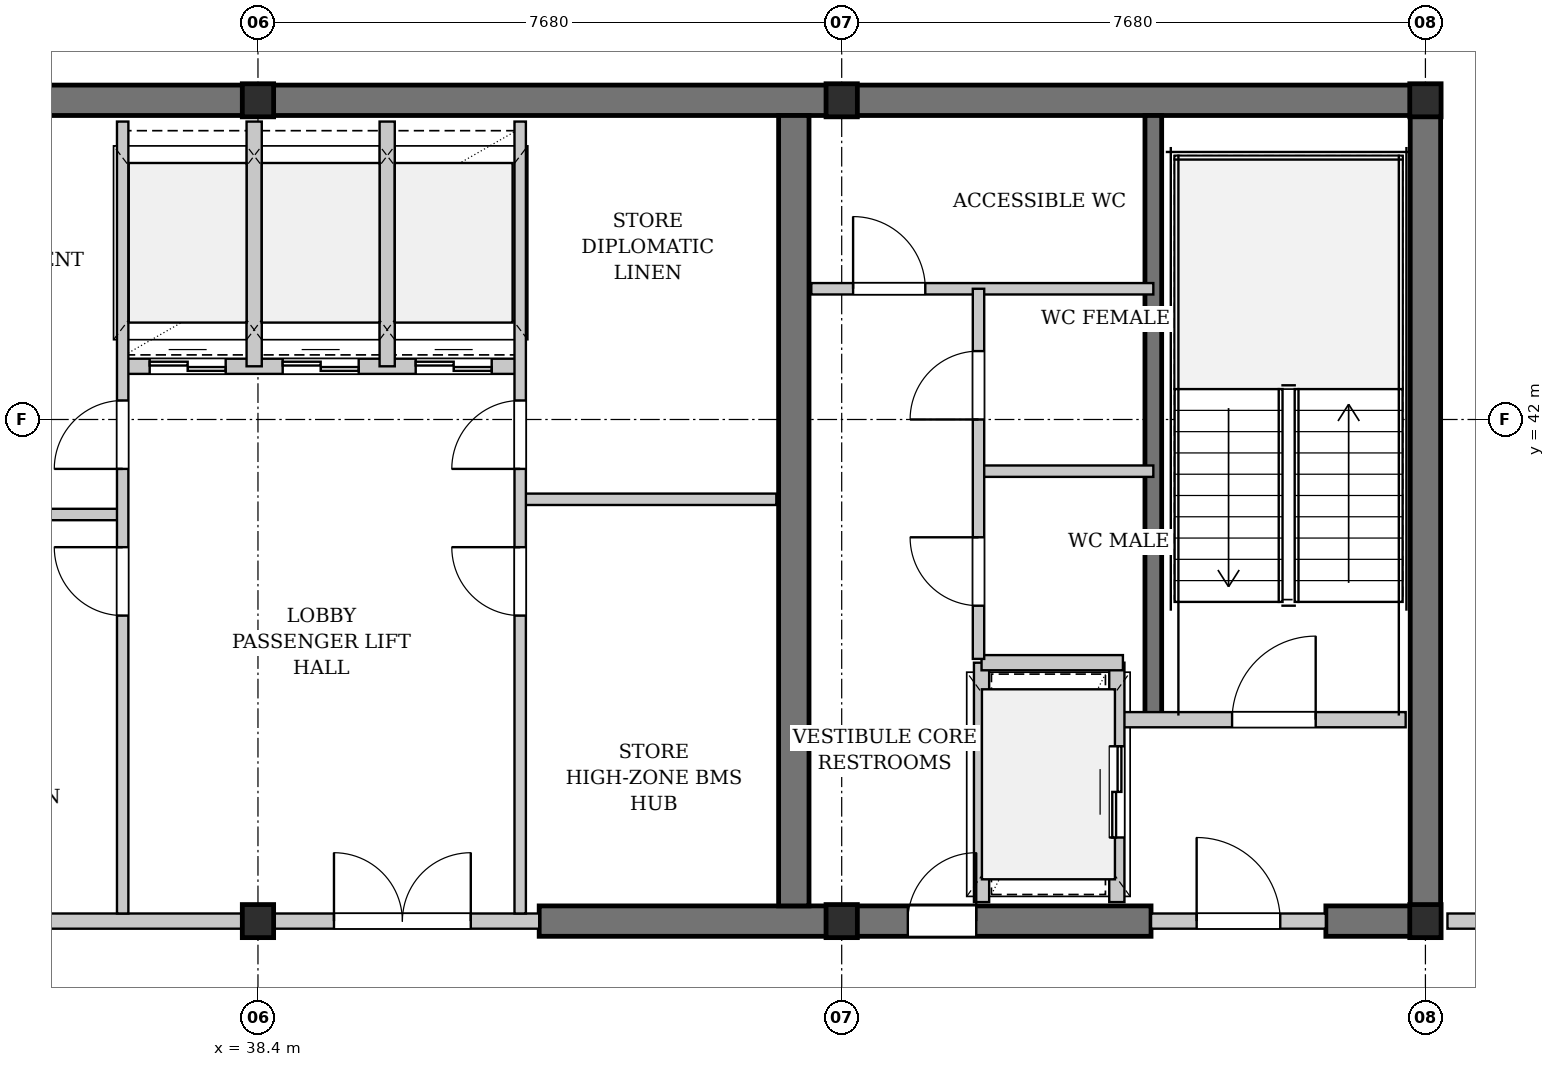
"""IFC4 building model, lengths in metres.
Left out: names, types, materials, properties, quantities, classifications, styles, units other than length and angle.
Written with IfcOpenShell. Run it as: python <this file> out.ifc"""

import sys

from ifc_helpers import new_model, si_unit, direction, frame, frame_2d, origin, origin_2d, place, context, subcontext, project, spatial, rectangle, i_section, extrude, element, fill, save


model = new_model("IFC4")
c1 = context("Model", 3, precision=1e-05, world=origin(), true_north=direction((0.0, 1.0)))
c2 = subcontext(c1, "Body", "Model", "MODEL_VIEW")
j1 = project(units=[si_unit("LENGTHUNIT", "METRE"), si_unit("PLANEANGLEUNIT", "RADIAN")], contexts=[c1])
p1 = place(None, origin())
s1 = spatial("IfcSite", under=j1, at=p1, CompositionType="ELEMENT")
p2 = place(p1, origin())
s2 = spatial("IfcBuilding", under=s1, at=p2, CompositionType="ELEMENT")
p3 = place(p2, frame((0.0, 0.0, 255.2)))
s3 = spatial("IfcBuildingStorey", under=s2, at=p3, CompositionType="ELEMENT", Elevation=255.2)
p4 = place(p3, frame((22.84, 46.2, 0.0), z_axis=(0.0, 0.0, 1.0), x_axis=(1.0, 0.0, 0.0)))
e1 = element("IfcWall", 1, at=p4, inside=s3, PredefinedType="SHEAR", context=c2, shape_type="SweptSolid", body=[
    extrude(rectangle(XDim=31.12, YDim=0.4, at=frame_2d((15.56, 0.0))), origin(), (0.0, 0.0, 1.0), 3.48),
])
p5 = place(p3, frame((42.1, 35.4, 0.0), z_axis=(0.0, 0.0, 1.0), x_axis=(1.0, 0.0, 0.0)))
e2 = element("IfcWall", 2, at=p5, inside=s3, PredefinedType="SHEAR", context=c2, shape_type="SweptSolid", body=[
    extrude(rectangle(XDim=8.05, YDim=0.4, at=frame_2d((4.025, 0.0))), origin(), (0.0, 0.0, 1.0), 3.48),
])
p6 = place(p5, frame((4.85, 0.0, 0.0)))
e3 = element("IfcOpeningElement", 3, at=p6, cuts=e2, PredefinedType="OPENING", context=c2, shape_type="SweptSolid", body=[
    extrude(rectangle(XDim=0.9, YDim=2.15, at=frame_2d((0.45, 1.075))), frame((0.0, 0.21, 0.0), z_axis=(0.0, -1.0, 0.0), x_axis=(1.0, 0.0, 0.0)), (0.0, 0.0, 1.0), 0.42),
])
p7 = place(p3, frame((52.45, 35.4, 0.0), z_axis=(0.0, 0.0, 1.0), x_axis=(1.0, 0.0, 0.0)))
e4 = element("IfcWall", 4, at=p7, inside=s3, PredefinedType="SHEAR", context=c2, shape_type="SweptSolid", body=[
    extrude(rectangle(XDim=1.51, YDim=0.4, at=frame_2d((0.755, 0.0))), origin(), (0.0, 0.0, 1.0), 3.48),
])
for number, where, z_axis, x_axis in (
    (5, (45.45, 35.6, 0.0), (0.0, 0.0, 1.0), (0.0, 1.0, 0.0)),
    (6, (53.76, 35.6, 0.0), (0.0, 0.0, 1.0), (0.0, 1.0, 0.0)),
):
    element("IfcWall", number, at=place(p3, frame(where, z_axis=z_axis, x_axis=x_axis)), inside=s3, PredefinedType="SHEAR", context=c2, shape_type="SweptSolid", body=[
        extrude(rectangle(XDim=10.4, YDim=0.4, at=frame_2d((5.2, 0.0))), origin(), (0.0, 0.0, 1.0), 3.48),
    ])
p8 = place(p3, frame((50.18, 38.05, 0.0), z_axis=(0.0, 0.0, 1.0), x_axis=(0.0, 1.0, 0.0)))
e7 = element("IfcWall", 7, at=p8, inside=s3, PredefinedType="SHEAR", context=c2, shape_type="SweptSolid", body=[
    extrude(rectangle(XDim=7.95, YDim=0.22, at=frame_2d((3.975, 0.0))), origin(), (0.0, 0.0, 1.0), 3.48),
])
for number, where, z_axis, x_axis in (
    (8, (38.4, 35.4, 0.0), (0.0, 0.0, 1.0), (1.0, 0.0, 0.0)),
    (9, (38.4, 46.2, 0.0), (0.0, 0.0, 1.0), (1.0, 0.0, 0.0)),
    (10, (46.08, 35.4, 0.0), (0.0, 0.0, 1.0), (1.0, 0.0, 0.0)),
    (11, (46.08, 46.2, 0.0), (0.0, 0.0, 1.0), (1.0, 0.0, 0.0)),
    (12, (53.76, 35.4, 0.0), (0.0, 0.0, 1.0), (1.0, 0.0, 0.0)),
    (13, (53.76, 46.2, 0.0), (0.0, 0.0, 1.0), (1.0, 0.0, 0.0)),
):
    element("IfcColumn", number, at=place(p3, frame(where, z_axis=z_axis, x_axis=x_axis)), inside=s3, PredefinedType="COLUMN", context=c2, shape_type="SweptSolid", body=[
        extrude(i_section(OverallWidth=0.412, OverallDepth=0.435, WebThickness=0.036, FlangeThickness=0.058, FilletRadius=0.015, at=origin_2d()), origin(), (0.0, 0.0, 1.0), 3.9),
    ])
p9 = place(p3, frame((35.6, 35.4, 0.0), z_axis=(0.0, 0.0, 1.0), x_axis=(1.0, 0.0, 0.0)))
e14 = element("IfcWall", 14, at=p9, inside=s3, PredefinedType="PARTITIONING", context=c2, shape_type="SweptSolid", body=[
    extrude(rectangle(XDim=6.5, YDim=0.2, at=frame_2d((3.25, 0.0))), origin(), (0.0, 0.0, 1.0), 2.275),
])
p10 = place(p9, frame((3.8, 0.0, 0.0)))
e15 = element("IfcOpeningElement", 15, at=p10, cuts=e14, PredefinedType="OPENING", context=c2, shape_type="SweptSolid", body=[
    extrude(rectangle(XDim=1.8, YDim=2.3, at=frame_2d((0.9, 1.15))), frame((0.0, 0.11, 0.0), z_axis=(0.0, -1.0, 0.0), x_axis=(1.0, 0.0, 0.0)), (0.0, 0.0, 1.0), 0.22),
])
p11 = place(p3, frame((36.6, 42.7, 0.0), z_axis=(0.0, 0.0, 1.0), x_axis=(1.0, 0.0, 0.0)))
e16 = element("IfcWall", 16, at=p11, inside=s3, PredefinedType="PARTITIONING", context=c2, shape_type="SweptSolid", body=[
    extrude(rectangle(XDim=5.25, YDim=0.2, at=frame_2d((2.625, 0.0))), origin(), (0.0, 0.0, 1.0), 3.48),
])
p12 = place(p11, frame((0.375, 0.0, 0.0)))
e17 = element("IfcOpeningElement", 17, at=p12, cuts=e16, PredefinedType="OPENING", context=c2, shape_type="SweptSolid", body=[
    extrude(rectangle(XDim=1.0, YDim=2.2, at=frame_2d((0.5, 1.1))), frame((0.0, 0.11, 0.0), z_axis=(0.0, -1.0, 0.0), x_axis=(1.0, 0.0, 0.0)), (0.0, 0.0, 1.0), 0.22),
])
p13 = place(p11, frame((2.125, 0.0, 0.0)))
e18 = element("IfcOpeningElement", 18, at=p13, cuts=e16, PredefinedType="OPENING", context=c2, shape_type="SweptSolid", body=[
    extrude(rectangle(XDim=1.0, YDim=2.2, at=frame_2d((0.5, 1.1))), frame((0.0, 0.11, 0.0), z_axis=(0.0, -1.0, 0.0), x_axis=(1.0, 0.0, 0.0)), (0.0, 0.0, 1.0), 0.22),
])
p14 = place(p11, frame((3.875, 0.0, 0.0)))
e19 = element("IfcOpeningElement", 19, at=p14, cuts=e16, PredefinedType="OPENING", context=c2, shape_type="SweptSolid", body=[
    extrude(rectangle(XDim=1.0, YDim=2.2, at=frame_2d((0.5, 1.1))), frame((0.0, 0.11, 0.0), z_axis=(0.0, -1.0, 0.0), x_axis=(1.0, 0.0, 0.0)), (0.0, 0.0, 1.0), 0.22),
])
p15 = place(p3, frame((38.35, 42.7, 0.0), z_axis=(0.0, 0.0, 1.0), x_axis=(0.0, 1.0, 0.0)))
e20 = element("IfcWall", 20, at=p15, inside=s3, PredefinedType="PARTITIONING", context=c2, shape_type="SweptSolid", body=[
    extrude(rectangle(XDim=3.22, YDim=0.2, at=frame_2d((1.61, 0.0))), origin(), (0.0, 0.0, 1.0), 2.661),
])
p16 = place(p3, frame((40.1, 42.7, 0.0), z_axis=(0.0, 0.0, 1.0), x_axis=(0.0, 1.0, 0.0)))
e21 = element("IfcWall", 21, at=p16, inside=s3, PredefinedType="PARTITIONING", context=c2, shape_type="SweptSolid", body=[
    extrude(rectangle(XDim=3.22, YDim=0.2, at=frame_2d((1.61, 0.0))), origin(), (0.0, 0.0, 1.0), 3.48),
])
p17 = place(p3, frame((33.05, 40.75, 0.0), z_axis=(0.0, 0.0, 1.0), x_axis=(1.0, 0.0, 0.0)))
e22 = element("IfcWall", 22, at=p17, inside=s3, PredefinedType="PARTITIONING", context=c2, shape_type="SweptSolid", body=[
    extrude(rectangle(XDim=3.57, YDim=0.15, at=frame_2d((1.785, 0.0))), origin(), (0.0, 0.0, 1.0), 3.48),
])
p18 = place(p3, frame((36.62, 35.5, 0.0), z_axis=(0.0, 0.0, 1.0), x_axis=(0.0, 1.0, 0.0)))
e23 = element("IfcWall", 23, at=p18, inside=s3, PredefinedType="PARTITIONING", context=c2, shape_type="SweptSolid", body=[
    extrude(rectangle(XDim=10.42, YDim=0.15, at=frame_2d((5.21, 0.0))), origin(), (0.0, 0.0, 1.0), 3.48),
])
p19 = place(p18, frame((3.92, 0.0, 0.0)))
e24 = element("IfcOpeningElement", 24, at=p19, cuts=e23, PredefinedType="OPENING", context=c2, shape_type="SweptSolid", body=[
    extrude(rectangle(XDim=0.9, YDim=2.15, at=frame_2d((0.45, 1.075))), frame((0.0, 0.085, 0.0), z_axis=(0.0, -1.0, 0.0), x_axis=(1.0, 0.0, 0.0)), (0.0, 0.0, 1.0), 0.17),
])
p20 = place(p18, frame((5.85, 0.0, 0.0)))
e25 = element("IfcOpeningElement", 25, at=p20, cuts=e23, PredefinedType="OPENING", context=c2, shape_type="SweptSolid", body=[
    extrude(rectangle(XDim=0.9, YDim=2.15, at=frame_2d((0.45, 1.075))), frame((0.0, 0.085, 0.0), z_axis=(0.0, -1.0, 0.0), x_axis=(1.0, 0.0, 0.0)), (0.0, 0.0, 1.0), 0.17),
])
p21 = place(p3, frame((41.85, 40.95, 0.0), z_axis=(0.0, 0.0, 1.0), x_axis=(1.0, 0.0, 0.0)))
e26 = element("IfcWall", 26, at=p21, inside=s3, PredefinedType="PARTITIONING", context=c2, shape_type="SweptSolid", body=[
    extrude(rectangle(XDim=3.37, YDim=0.15, at=frame_2d((1.685, 0.0))), origin(), (0.0, 0.0, 1.0), 3.48),
])
p22 = place(p3, frame((41.85, 35.5, 0.0), z_axis=(0.0, 0.0, 1.0), x_axis=(0.0, 1.0, 0.0)))
e27 = element("IfcWall", 27, at=p22, inside=s3, PredefinedType="PARTITIONING", context=c2, shape_type="SweptSolid", body=[
    extrude(rectangle(XDim=10.42, YDim=0.15, at=frame_2d((5.21, 0.0))), origin(), (0.0, 0.0, 1.0), 3.48),
])
p23 = place(p22, frame((3.92, 0.0, 0.0)))
e28 = element("IfcOpeningElement", 28, at=p23, cuts=e27, PredefinedType="OPENING", context=c2, shape_type="SweptSolid", body=[
    extrude(rectangle(XDim=0.9, YDim=2.15, at=frame_2d((0.45, 1.075))), frame((0.0, 0.085, 0.0), z_axis=(0.0, -1.0, 0.0), x_axis=(1.0, 0.0, 0.0)), (0.0, 0.0, 1.0), 0.17),
])
p24 = place(p22, frame((5.85, 0.0, 0.0)))
e29 = element("IfcOpeningElement", 29, at=p24, cuts=e27, PredefinedType="OPENING", context=c2, shape_type="SweptSolid", body=[
    extrude(rectangle(XDim=0.9, YDim=2.15, at=frame_2d((0.45, 1.075))), frame((0.0, 0.085, 0.0), z_axis=(0.0, -1.0, 0.0), x_axis=(1.0, 0.0, 0.0)), (0.0, 0.0, 1.0), 0.17),
])
p25 = place(p3, frame((49.78, 38.05, 0.0), z_axis=(0.0, 0.0, 1.0), x_axis=(1.0, 0.0, 0.0)))
e30 = element("IfcWall", 30, at=p25, inside=s3, PredefinedType="PARTITIONING", context=c2, shape_type="SweptSolid", body=[
    extrude(rectangle(XDim=3.72, YDim=0.2, at=frame_2d((1.86, 0.0))), origin(), (0.0, 0.0, 1.0), 3.48),
])
p26 = place(p25, frame((1.436, 0.0, 0.0)))
e31 = element("IfcOpeningElement", 31, at=p26, cuts=e30, PredefinedType="OPENING", context=c2, shape_type="SweptSolid", body=[
    extrude(rectangle(XDim=1.1, YDim=2.15, at=frame_2d((0.55, 1.075))), frame((0.0, 0.11, 0.0), z_axis=(0.0, -1.0, 0.0), x_axis=(1.0, 0.0, 0.0)), (0.0, 0.0, 1.0), 0.22),
])
p27 = place(p3, frame((50.15, 35.4, 0.0), z_axis=(0.0, 0.0, 1.0), x_axis=(1.0, 0.0, 0.0)))
e32 = element("IfcWall", 32, at=p27, inside=s3, PredefinedType="PARTITIONING", context=c2, shape_type="SweptSolid", body=[
    extrude(rectangle(XDim=2.3, YDim=0.2, at=frame_2d((1.15, 0.0))), origin(), (0.0, 0.0, 1.0), 2.661),
])
p28 = place(p27, frame((0.6, 0.0, 0.0)))
e33 = element("IfcOpeningElement", 33, at=p28, cuts=e32, PredefinedType="OPENING", context=c2, shape_type="SweptSolid", body=[
    extrude(rectangle(XDim=1.1, YDim=2.15, at=frame_2d((0.55, 1.075))), frame((0.0, 0.11, 0.0), z_axis=(0.0, -1.0, 0.0), x_axis=(1.0, 0.0, 0.0)), (0.0, 0.0, 1.0), 0.22),
])
p29 = place(p3, frame((49.7, 35.65, 0.0), z_axis=(0.0, 0.0, 1.0), x_axis=(0.0, 1.0, 0.0)))
e34 = element("IfcWall", 34, at=p29, inside=s3, PredefinedType="PARTITIONING", context=c2, shape_type="SweptSolid", body=[
    extrude(rectangle(XDim=3.15, YDim=0.2, at=frame_2d((1.575, 0.0))), origin(), (0.0, 0.0, 1.0), 3.48),
])
p30 = place(p29, frame((0.85, 0.0, 0.0)))
e35 = element("IfcOpeningElement", 35, at=p30, cuts=e34, PredefinedType="OPENING", context=c2, shape_type="SweptSolid", body=[
    extrude(rectangle(XDim=1.2, YDim=2.2, at=frame_2d((0.6, 1.1))), frame((0.0, 0.11, 0.0), z_axis=(0.0, -1.0, 0.0), x_axis=(1.0, 0.0, 0.0)), (0.0, 0.0, 1.0), 0.22),
])
p31 = place(p3, frame((47.92, 35.65, 0.0), z_axis=(0.0, 0.0, 1.0), x_axis=(0.0, 1.0, 0.0)))
e36 = element("IfcWall", 36, at=p31, inside=s3, PredefinedType="PARTITIONING", context=c2, shape_type="SweptSolid", body=[
    extrude(rectangle(XDim=3.15, YDim=0.2, at=frame_2d((1.575, 0.0))), origin(), (0.0, 0.0, 1.0), 3.48),
])
p32 = place(p3, frame((47.92, 38.8, 0.0), z_axis=(0.0, 0.0, 1.0), x_axis=(1.0, 0.0, 0.0)))
e37 = element("IfcWall", 37, at=p32, inside=s3, PredefinedType="PARTITIONING", context=c2, shape_type="SweptSolid", body=[
    extrude(rectangle(XDim=1.86, YDim=0.2, at=frame_2d((0.93, 0.0))), origin(), (0.0, 0.0, 1.0), 3.48),
])
p33 = place(p3, frame((45.68, 43.72, 0.0), z_axis=(0.0, 0.0, 1.0), x_axis=(1.0, 0.0, 0.0)))
e38 = element("IfcWall", 38, at=p33, inside=s3, PredefinedType="PARTITIONING", context=c2, shape_type="SweptSolid", body=[
    extrude(rectangle(XDim=4.5, YDim=0.15, at=frame_2d((2.25, 0.0))), origin(), (0.0, 0.0, 1.0), 3.48),
])
p34 = place(p33, frame((0.55, 0.0, 0.0)))
e39 = element("IfcOpeningElement", 39, at=p34, cuts=e38, PredefinedType="OPENING", context=c2, shape_type="SweptSolid", body=[
    extrude(rectangle(XDim=0.95, YDim=2.15, at=frame_2d((0.475, 1.075))), frame((0.0, 0.085, 0.0), z_axis=(0.0, -1.0, 0.0), x_axis=(1.0, 0.0, 0.0)), (0.0, 0.0, 1.0), 0.17),
])
p35 = place(p3, frame((47.88, 41.32, 0.0), z_axis=(0.0, 0.0, 1.0), x_axis=(1.0, 0.0, 0.0)))
e40 = element("IfcWall", 40, at=p35, inside=s3, PredefinedType="PARTITIONING", context=c2, shape_type="SweptSolid", body=[
    extrude(rectangle(XDim=2.3, YDim=0.15, at=frame_2d((1.15, 0.0))), origin(), (0.0, 0.0, 1.0), 3.48),
])
p36 = place(p3, frame((47.88, 38.85, 0.0), z_axis=(0.0, 0.0, 1.0), x_axis=(0.0, 1.0, 0.0)))
e41 = element("IfcWall", 41, at=p36, inside=s3, PredefinedType="PARTITIONING", context=c2, shape_type="SweptSolid", body=[
    extrude(rectangle(XDim=4.87, YDim=0.15, at=frame_2d((2.435, 0.0))), origin(), (0.0, 0.0, 1.0), 3.48),
])
p37 = place(p36, frame((0.7, 0.0, 0.0)))
e42 = element("IfcOpeningElement", 42, at=p37, cuts=e41, PredefinedType="OPENING", context=c2, shape_type="SweptSolid", body=[
    extrude(rectangle(XDim=0.9, YDim=2.15, at=frame_2d((0.45, 1.075))), frame((0.0, 0.085, 0.0), z_axis=(0.0, -1.0, 0.0), x_axis=(1.0, 0.0, 0.0)), (0.0, 0.0, 1.0), 0.17),
])
p38 = place(p36, frame((3.15, 0.0, 0.0)))
e43 = element("IfcOpeningElement", 43, at=p38, cuts=e41, PredefinedType="OPENING", context=c2, shape_type="SweptSolid", body=[
    extrude(rectangle(XDim=0.9, YDim=2.15, at=frame_2d((0.45, 1.075))), frame((0.0, 0.085, 0.0), z_axis=(0.0, -1.0, 0.0), x_axis=(1.0, 0.0, 0.0)), (0.0, 0.0, 1.0), 0.17),
])
p39 = place(p3, frame((54.05, 35.4, 0.0), z_axis=(0.0, 0.0, 1.0), x_axis=(1.0, 0.0, 0.0)))
e44 = element("IfcWall", 44, at=p39, inside=s3, PredefinedType="PARTITIONING", context=c2, shape_type="SweptSolid", body=[
    extrude(rectangle(XDim=3.8, YDim=0.2, at=frame_2d((1.9, 0.0))), origin(), (0.0, 0.0, 1.0), 3.48),
])
p40 = place(p39, frame((1.35, 0.0, 0.0)))
e45 = element("IfcOpeningElement", 45, at=p40, cuts=e44, PredefinedType="OPENING", context=c2, shape_type="SweptSolid", body=[
    extrude(rectangle(XDim=1.1, YDim=2.15, at=frame_2d((0.55, 1.075))), frame((0.0, 0.11, 0.0), z_axis=(0.0, -1.0, 0.0), x_axis=(1.0, 0.0, 0.0)), (0.0, 0.0, 1.0), 0.22),
])
p41 = place(p10, origin())
e46 = element("IfcDoor", 46, at=p41, inside=s3, OperationType="DOUBLE_DOOR_SINGLE_SWING", PredefinedType="DOOR", context=c2, shape_type="SweptSolid", body=[
    extrude(rectangle(XDim=1.8, YDim=2.3, at=frame_2d((0.9, 1.15))), frame((0.0, 0.025, 0.0), z_axis=(0.0, -1.0, 0.0), x_axis=(1.0, 0.0, 0.0)), (0.0, 0.0, 1.0), 0.05),
])
fill(e15, e46)
p42 = place(p12, origin())
e47 = element("IfcDoor", 47, at=p42, inside=s3, OperationType="DOUBLE_DOOR_SLIDING", PredefinedType="DOOR", context=c2, shape_type="SweptSolid", body=[
    extrude(rectangle(XDim=1.0, YDim=2.2, at=frame_2d((0.5, 1.1))), frame((0.0, 0.025, 0.0), z_axis=(0.0, -1.0, 0.0), x_axis=(1.0, 0.0, 0.0)), (0.0, 0.0, 1.0), 0.05),
])
fill(e17, e47)
p43 = place(p13, origin())
e48 = element("IfcDoor", 48, at=p43, inside=s3, OperationType="DOUBLE_DOOR_SLIDING", PredefinedType="DOOR", context=c2, shape_type="SweptSolid", body=[
    extrude(rectangle(XDim=1.0, YDim=2.2, at=frame_2d((0.5, 1.1))), frame((0.0, 0.025, 0.0), z_axis=(0.0, -1.0, 0.0), x_axis=(1.0, 0.0, 0.0)), (0.0, 0.0, 1.0), 0.05),
])
fill(e18, e48)
p44 = place(p14, origin())
e49 = element("IfcDoor", 49, at=p44, inside=s3, OperationType="DOUBLE_DOOR_SLIDING", PredefinedType="DOOR", context=c2, shape_type="SweptSolid", body=[
    extrude(rectangle(XDim=1.0, YDim=2.2, at=frame_2d((0.5, 1.1))), frame((0.0, 0.025, 0.0), z_axis=(0.0, -1.0, 0.0), x_axis=(1.0, 0.0, 0.0)), (0.0, 0.0, 1.0), 0.05),
])
fill(e19, e49)
p45 = place(p19, origin())
e50 = element("IfcDoor", 50, at=p45, inside=s3, OperationType="SINGLE_SWING_RIGHT", PredefinedType="DOOR", context=c2, shape_type="SweptSolid", body=[
    extrude(rectangle(XDim=0.9, YDim=2.15, at=frame_2d((0.45, 1.075))), frame((0.0, 0.025, 0.0), z_axis=(0.0, -1.0, 0.0), x_axis=(1.0, 0.0, 0.0)), (0.0, 0.0, 1.0), 0.05),
])
fill(e24, e50)
p46 = place(p20, origin())
e51 = element("IfcDoor", 51, at=p46, inside=s3, OperationType="SINGLE_SWING_LEFT", PredefinedType="DOOR", context=c2, shape_type="SweptSolid", body=[
    extrude(rectangle(XDim=0.9, YDim=2.15, at=frame_2d((0.45, 1.075))), frame((0.0, 0.025, 0.0), z_axis=(0.0, -1.0, 0.0), x_axis=(1.0, 0.0, 0.0)), (0.0, 0.0, 1.0), 0.05),
])
fill(e25, e51)
p47 = place(p23, origin())
e52 = element("IfcDoor", 52, at=p47, inside=s3, OperationType="SINGLE_SWING_RIGHT", PredefinedType="DOOR", context=c2, shape_type="SweptSolid", body=[
    extrude(rectangle(XDim=0.9, YDim=2.15, at=frame_2d((0.45, 1.075))), frame((0.0, 0.025, 0.0), z_axis=(0.0, -1.0, 0.0), x_axis=(1.0, 0.0, 0.0)), (0.0, 0.0, 1.0), 0.05),
])
fill(e28, e52)
p48 = place(p24, origin())
e53 = element("IfcDoor", 53, at=p48, inside=s3, OperationType="SINGLE_SWING_LEFT", PredefinedType="DOOR", context=c2, shape_type="SweptSolid", body=[
    extrude(rectangle(XDim=0.9, YDim=2.15, at=frame_2d((0.45, 1.075))), frame((0.0, 0.025, 0.0), z_axis=(0.0, -1.0, 0.0), x_axis=(1.0, 0.0, 0.0)), (0.0, 0.0, 1.0), 0.05),
])
fill(e29, e53)
p49 = place(p26, origin())
e54 = element("IfcDoor", 54, at=p49, inside=s3, OperationType="SINGLE_SWING_RIGHT", PredefinedType="DOOR", context=c2, shape_type="SweptSolid", body=[
    extrude(rectangle(XDim=1.1, YDim=2.15, at=frame_2d((0.55, 1.075))), frame((0.0, 0.025, 0.0), z_axis=(0.0, -1.0, 0.0), x_axis=(1.0, 0.0, 0.0)), (0.0, 0.0, 1.0), 0.05),
])
fill(e31, e54)
p50 = place(p28, origin())
e55 = element("IfcDoor", 55, at=p50, inside=s3, OperationType="SINGLE_SWING_LEFT", PredefinedType="DOOR", context=c2, shape_type="SweptSolid", body=[
    extrude(rectangle(XDim=1.1, YDim=2.15, at=frame_2d((0.55, 1.075))), frame((0.0, 0.025, 0.0), z_axis=(0.0, -1.0, 0.0), x_axis=(1.0, 0.0, 0.0)), (0.0, 0.0, 1.0), 0.05),
])
fill(e33, e55)
p51 = place(p30, origin())
e56 = element("IfcDoor", 56, at=p51, inside=s3, OperationType="DOUBLE_DOOR_SLIDING", PredefinedType="DOOR", context=c2, shape_type="SweptSolid", body=[
    extrude(rectangle(XDim=1.2, YDim=2.2, at=frame_2d((0.6, 1.1))), frame((0.0, 0.025, 0.0), z_axis=(0.0, -1.0, 0.0), x_axis=(1.0, 0.0, 0.0)), (0.0, 0.0, 1.0), 0.05),
])
fill(e35, e56)
p52 = place(p34, origin())
e57 = element("IfcDoor", 57, at=p52, inside=s3, OperationType="SINGLE_SWING_LEFT", PredefinedType="DOOR", context=c2, shape_type="SweptSolid", body=[
    extrude(rectangle(XDim=0.95, YDim=2.15, at=frame_2d((0.475, 1.075))), frame((0.0, 0.025, 0.0), z_axis=(0.0, -1.0, 0.0), x_axis=(1.0, 0.0, 0.0)), (0.0, 0.0, 1.0), 0.05),
])
fill(e39, e57)
p53 = place(p37, origin())
e58 = element("IfcDoor", 58, at=p53, inside=s3, OperationType="SINGLE_SWING_RIGHT", PredefinedType="DOOR", context=c2, shape_type="SweptSolid", body=[
    extrude(rectangle(XDim=0.9, YDim=2.15, at=frame_2d((0.45, 1.075))), frame((0.0, 0.025, 0.0), z_axis=(0.0, -1.0, 0.0), x_axis=(1.0, 0.0, 0.0)), (0.0, 0.0, 1.0), 0.05),
])
fill(e42, e58)
p54 = place(p38, origin())
e59 = element("IfcDoor", 59, at=p54, inside=s3, OperationType="SINGLE_SWING_LEFT", PredefinedType="DOOR", context=c2, shape_type="SweptSolid", body=[
    extrude(rectangle(XDim=0.9, YDim=2.15, at=frame_2d((0.45, 1.075))), frame((0.0, 0.025, 0.0), z_axis=(0.0, -1.0, 0.0), x_axis=(1.0, 0.0, 0.0)), (0.0, 0.0, 1.0), 0.05),
])
fill(e43, e59)
p55 = place(p6, origin())
e60 = element("IfcDoor", 60, at=p55, inside=s3, OperationType="SINGLE_SWING_RIGHT", PredefinedType="DOOR", context=c2, shape_type="SweptSolid", body=[
    extrude(rectangle(XDim=0.9, YDim=2.15, at=frame_2d((0.45, 1.075))), frame((0.0, 0.025, 0.0), z_axis=(0.0, -1.0, 0.0), x_axis=(1.0, 0.0, 0.0)), (0.0, 0.0, 1.0), 0.05),
])
fill(e3, e60)
save(model, sys.argv[1])
